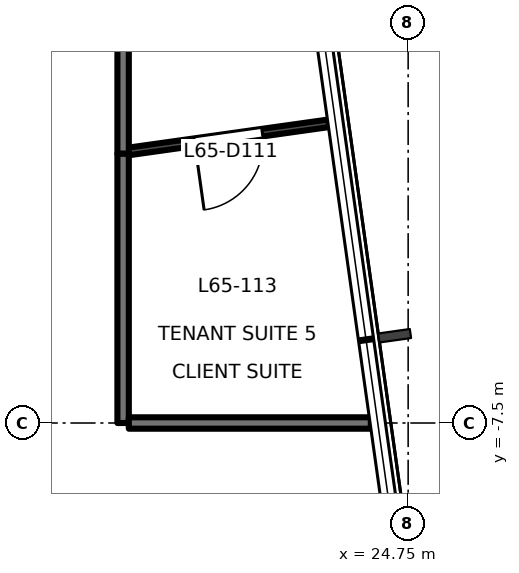
"""IFC4 building model, lengths in metres.
Left out: names, types, materials, properties, quantities, classifications, styles, units other than length and angle.
Written with IfcOpenShell. Run it as: python <this file> out.ifc"""

import sys

from ifc_helpers import new_model, si_unit, direction, frame, frame_2d, origin, place, context, subcontext, project, spatial, rectangle, extrude, element, fill, save


model = new_model("IFC4")
c1 = context("Model", 3, precision=1e-05, world=origin(), true_north=direction((0.0, 1.0)))
c2 = subcontext(c1, "Body", "Model", "MODEL_VIEW")
j1 = project(units=[si_unit("LENGTHUNIT", "METRE"), si_unit("PLANEANGLEUNIT", "RADIAN")], contexts=[c1])
p1 = place(None, origin())
s1 = spatial("IfcSite", under=j1, at=p1, CompositionType="ELEMENT")
p2 = place(p1, origin())
s2 = spatial("IfcBuilding", under=s1, at=p2, CompositionType="ELEMENT")
p3 = place(p2, frame((0.0, 0.0, 282.4)))
s3 = spatial("IfcBuildingStorey", under=s2, at=p3, CompositionType="ELEMENT", Elevation=282.4)
p4 = place(p3, frame((21.0, 5.5, 0.0), z_axis=(0.0, 0.0, 1.0), x_axis=(0.0, -1.0, 0.0)))
e1 = element("IfcWall", 1, at=p4, inside=s3, PredefinedType="PARTITIONING", context=c2, shape_type="SweptSolid", body=[
    extrude(rectangle(XDim=9.458, YDim=0.15, at=frame_2d((4.729, 0.0))), origin(), (0.0, 0.0, 1.0), 3.4),
])
p5 = place(p4, frame((2.115, 0.0, 0.0)))
e2 = element("IfcOpeningElement", 2, at=p5, cuts=e1, PredefinedType="OPENING", context=c2, shape_type="SweptSolid", body=[
    extrude(rectangle(XDim=1.5, YDim=2.1, at=frame_2d((0.75, 1.05))), frame((0.0, 0.085, 0.0), z_axis=(0.0, -1.0, 0.0), x_axis=(1.0, 0.0, 0.0)), (0.0, 0.0, 1.0), 0.171),
])
p6 = place(p3, frame((21.0, -3.958, 0.0), z_axis=(0.0, 0.0, 1.0), x_axis=(0.0, -1.0, 0.0)))
e3 = element("IfcWall", 3, at=p6, inside=s3, PredefinedType="PARTITIONING", context=c2, shape_type="SweptSolid", body=[
    extrude(rectangle(XDim=3.542, YDim=0.15, at=frame_2d((1.771, 0.0))), origin(), (0.0, 0.0, 1.0), 3.4),
])
p7 = place(p3, frame((21.075, -7.5, 0.0), z_axis=(0.0, 0.0, 1.0), x_axis=(1.0, 0.0, 0.0)))
e4 = element("IfcWall", 4, at=p7, inside=s3, PredefinedType="PARTITIONING", context=c2, shape_type="SweptSolid", body=[
    extrude(rectangle(XDim=3.184, YDim=0.15, at=frame_2d((1.592, 0.0))), origin(), (0.0, 0.0, 1.0), 3.7),
])
p8 = place(p3, frame((23.705, -3.557, 0.0), z_axis=(0.0, 0.0, 1.0), x_axis=(-0.990242548456, -0.139354566582, 0.0)))
e5 = element("IfcWall", 5, at=p8, inside=s3, PredefinedType="PARTITIONING", context=c2, shape_type="SweptSolid", body=[
    extrude(rectangle(XDim=2.663, YDim=0.1, at=frame_2d((1.332, 0.0))), origin(), (0.0, 0.0, 1.0), 3.7),
])
p9 = place(p8, frame((0.882, 0.0, 0.0)))
e6 = element("IfcOpeningElement", 6, at=p9, cuts=e5, PredefinedType="OPENING", context=c2, shape_type="SweptSolid", body=[
    extrude(rectangle(XDim=0.9, YDim=2.1, at=frame_2d((0.45, 1.05))), frame((0.0, 0.061, 0.0), z_axis=(0.0, -1.0, 0.0), x_axis=(1.0, 0.0, 0.0)), (0.0, 0.0, 1.0), 0.121),
])
p10 = place(p9, origin())
e7 = element("IfcDoor", 7, at=p10, inside=s3, OperationType="SINGLE_SWING_RIGHT", PredefinedType="DOOR", context=c2, shape_type="SweptSolid", body=[
    extrude(rectangle(XDim=0.9, YDim=2.1, at=frame_2d((0.45, 1.05))), frame((0.0, 0.025, 0.0), z_axis=(0.0, -1.0, 0.0), x_axis=(1.0, 0.0, 0.0)), (0.0, 0.0, 1.0), 0.05),
])
fill(e6, e7)
save(model, sys.argv[1])
